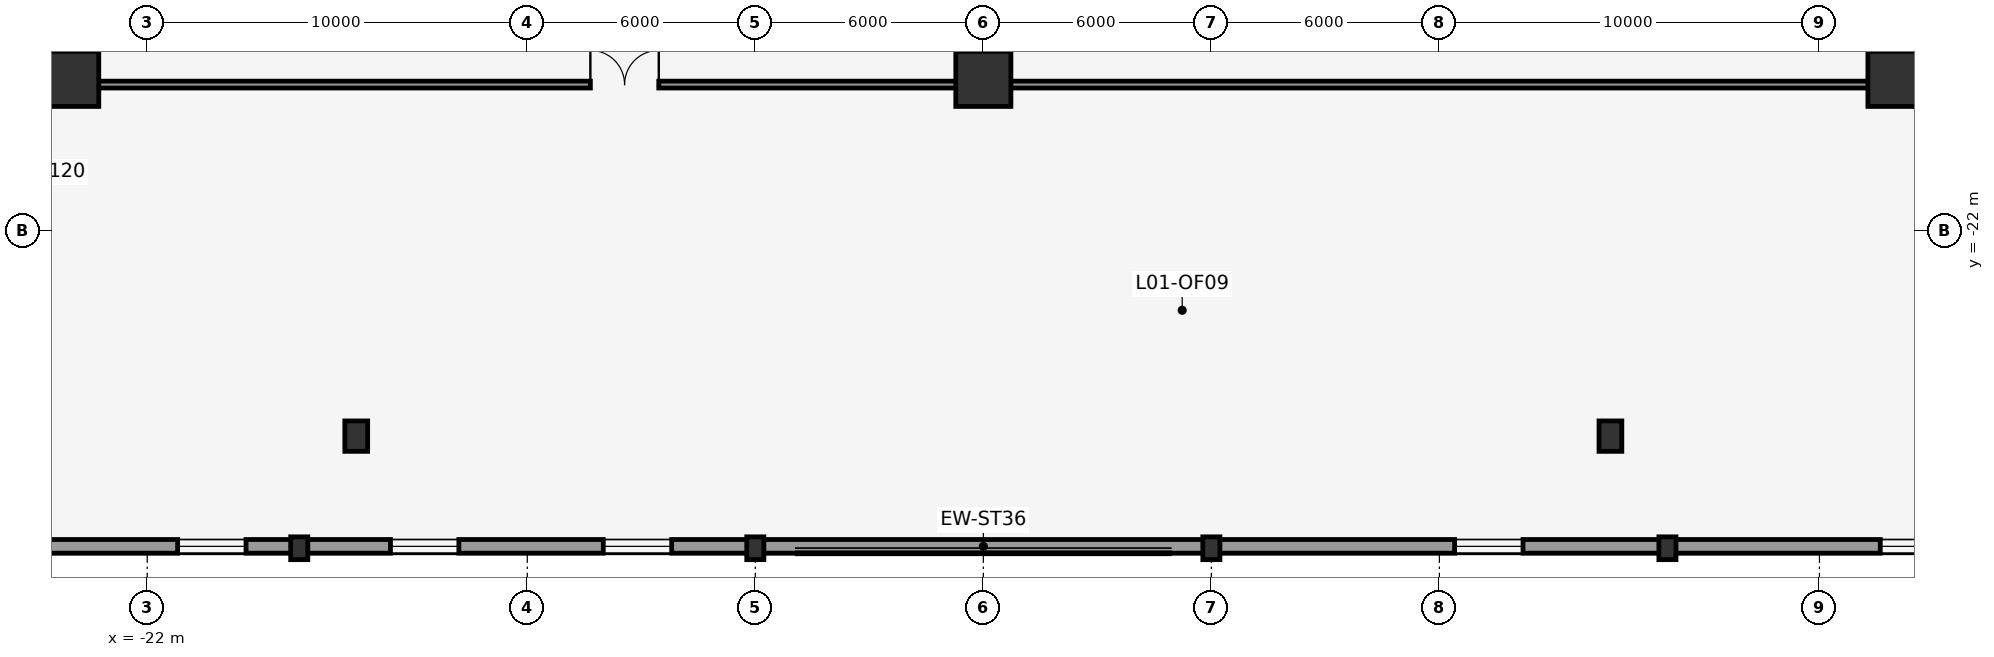
"""IFC4 building model, lengths in metres.
Left out: names, types, materials, properties, quantities, classifications, styles, units other than length and angle.
Written with IfcOpenShell. Run it as: python <this file> out.ifc"""

import sys

from ifc_helpers import new_model, si_unit, direction, frame, frame_2d, origin, origin_2d, place, context, subcontext, project, spatial, rectangle, hollow_rectangle, extrude, element, fill, save


model = new_model("IFC4")
c1 = context("Model", 3, precision=1e-05, world=origin(), true_north=direction((0.0, 1.0)))
c2 = subcontext(c1, "Body", "Model", "MODEL_VIEW")
j1 = project(units=[si_unit("LENGTHUNIT", "METRE"), si_unit("PLANEANGLEUNIT", "RADIAN")], contexts=[c1])
p1 = place(None, origin())
s1 = spatial("IfcSite", under=j1, at=p1, CompositionType="ELEMENT")
p2 = place(p1, origin())
s2 = spatial("IfcBuilding", under=s1, at=p2, CompositionType="ELEMENT")
p3 = place(p2, frame((0.0, 0.0, 6.0)))
s3 = spatial("IfcBuildingStorey", under=s2, at=p3, CompositionType="ELEMENT", Elevation=6.0)
for number, where, z_axis, x_axis in (
    (1, (-24.0, -18.0, 0.0), (0.0, 0.0, 1.0), (1.0, 0.0, 0.0)),
    (2, (24.0, -18.0, 0.0), (0.0, 0.0, 1.0), (1.0, 0.0, 0.0)),
    (3, (0.0, -18.0, 0.0), (0.0, 0.0, 1.0), (1.0, 0.0, 0.0)),
):
    element("IfcColumn", number, at=place(p3, frame(where, z_axis=z_axis, x_axis=x_axis)), inside=s3, PredefinedType="COLUMN", context=c2, shape_type="SweptSolid", body=[
        extrude(rectangle(XDim=1.45, YDim=1.45, at=origin_2d()), origin(), (0.0, 0.0, 1.0), 5.5),
    ])
for number, where, z_axis, x_axis in (
    (4, (-16.5, -27.4, 0.0), (0.0, 0.0, 1.0), (1.0, 0.0, 0.0)),
    (5, (16.5, -27.4, 0.0), (0.0, 0.0, 1.0), (1.0, 0.0, 0.0)),
):
    element("IfcColumn", number, at=place(p3, frame(where, z_axis=z_axis, x_axis=x_axis)), inside=s3, PredefinedType="COLUMN", context=c2, shape_type="SweptSolid", body=[
        extrude(hollow_rectangle(XDim=0.6, YDim=0.8, WallThickness=0.05, at=origin_2d()), origin(), (0.0, 0.0, 1.0), 5.5),
    ])
for number, where, z_axis, x_axis in (
    (6, (-18.0, -30.35, 0.0), (0.0, 0.0, 1.0), (1.0, 0.0, 0.0)),
    (7, (-6.0, -30.35, 0.0), (0.0, 0.0, 1.0), (1.0, 0.0, 0.0)),
    (8, (6.0, -30.35, 0.0), (0.0, 0.0, 1.0), (1.0, 0.0, 0.0)),
    (9, (18.0, -30.35, 0.0), (0.0, 0.0, 1.0), (1.0, 0.0, 0.0)),
):
    element("IfcColumn", number, at=place(p3, frame(where, z_axis=z_axis, x_axis=x_axis)), inside=s3, PredefinedType="PILASTER", context=c2, shape_type="SweptSolid", body=[
        extrude(rectangle(XDim=0.45, YDim=0.6, at=origin_2d()), origin(), (0.0, 0.0, 1.0), 5.5),
    ])
p4 = place(p3, frame((41.3, -30.3, 0.0), z_axis=(0.0, 0.0, 1.0), x_axis=(-1.0, 0.0, 0.0)))
e10 = element("IfcWall", 10, at=p4, inside=s3, PredefinedType="STANDARD", context=c2, shape_type="SweptSolid", body=[
    extrude(rectangle(XDim=82.6, YDim=0.36, at=frame_2d((41.3, 0.0))), origin(), (0.0, 0.0, 1.0), 5.2),
])
p5 = place(p4, frame((4.7, 0.0, 0.9)))
e11 = element("IfcOpeningElement", 11, at=p5, cuts=e10, PredefinedType="OPENING", context=c2, shape_type="SweptSolid", body=[
    extrude(rectangle(XDim=1.8, YDim=2.6, at=frame_2d((0.9, 1.3))), frame((0.0, 0.19, 0.0), z_axis=(0.0, -1.0, 0.0), x_axis=(1.0, 0.0, 0.0)), (0.0, 0.0, 1.0), 0.38),
])
p6 = place(p4, frame((15.9, 0.0, 0.9)))
e12 = element("IfcOpeningElement", 12, at=p6, cuts=e10, PredefinedType="OPENING", context=c2, shape_type="SweptSolid", body=[
    extrude(rectangle(XDim=1.8, YDim=2.6, at=frame_2d((0.9, 1.3))), frame((0.0, 0.19, 0.0), z_axis=(0.0, -1.0, 0.0), x_axis=(1.0, 0.0, 0.0)), (0.0, 0.0, 1.0), 0.38),
])
p7 = place(p4, frame((27.1, 0.0, 0.9)))
e13 = element("IfcOpeningElement", 13, at=p7, cuts=e10, PredefinedType="OPENING", context=c2, shape_type="SweptSolid", body=[
    extrude(rectangle(XDim=1.8, YDim=2.6, at=frame_2d((0.9, 1.3))), frame((0.0, 0.19, 0.0), z_axis=(0.0, -1.0, 0.0), x_axis=(1.0, 0.0, 0.0)), (0.0, 0.0, 1.0), 0.38),
])
p8 = place(p4, frame((49.5, 0.0, 0.9)))
e14 = element("IfcOpeningElement", 14, at=p8, cuts=e10, PredefinedType="OPENING", context=c2, shape_type="SweptSolid", body=[
    extrude(rectangle(XDim=1.8, YDim=2.6, at=frame_2d((0.9, 1.3))), frame((0.0, 0.19, 0.0), z_axis=(0.0, -1.0, 0.0), x_axis=(1.0, 0.0, 0.0)), (0.0, 0.0, 1.0), 0.38),
])
p9 = place(p4, frame((55.1, 0.0, 0.9)))
e15 = element("IfcOpeningElement", 15, at=p9, cuts=e10, PredefinedType="OPENING", context=c2, shape_type="SweptSolid", body=[
    extrude(rectangle(XDim=1.8, YDim=2.6, at=frame_2d((0.9, 1.3))), frame((0.0, 0.19, 0.0), z_axis=(0.0, -1.0, 0.0), x_axis=(1.0, 0.0, 0.0)), (0.0, 0.0, 1.0), 0.38),
])
p10 = place(p4, frame((60.7, 0.0, 0.9)))
e16 = element("IfcOpeningElement", 16, at=p10, cuts=e10, PredefinedType="OPENING", context=c2, shape_type="SweptSolid", body=[
    extrude(rectangle(XDim=1.8, YDim=2.6, at=frame_2d((0.9, 1.3))), frame((0.0, 0.19, 0.0), z_axis=(0.0, -1.0, 0.0), x_axis=(1.0, 0.0, 0.0)), (0.0, 0.0, 1.0), 0.38),
])
p11 = place(p4, frame((66.3, 0.0, 0.9)))
e17 = element("IfcOpeningElement", 17, at=p11, cuts=e10, PredefinedType="OPENING", context=c2, shape_type="SweptSolid", body=[
    extrude(rectangle(XDim=1.8, YDim=2.6, at=frame_2d((0.9, 1.3))), frame((0.0, 0.19, 0.0), z_axis=(0.0, -1.0, 0.0), x_axis=(1.0, 0.0, 0.0)), (0.0, 0.0, 1.0), 0.38),
])
p12 = place(p3, frame((-23.6, -18.15, 0.0), z_axis=(0.0, 0.0, 1.0), x_axis=(1.0, 0.0, 0.0)))
e18 = element("IfcWall", 18, at=p12, inside=s3, PredefinedType="PARTITIONING", context=c2, shape_type="SweptSolid", body=[
    extrude(rectangle(XDim=47.2, YDim=0.18, at=frame_2d((23.6, 0.0))), origin(), (0.0, 0.0, 1.0), 3.38),
])
p13 = place(p12, frame((13.26, 0.0, 0.0)))
e19 = element("IfcOpeningElement", 19, at=p13, cuts=e18, PredefinedType="OPENING", context=c2, shape_type="SweptSolid", body=[
    extrude(rectangle(XDim=1.8, YDim=2.2, at=frame_2d((0.9, 1.1))), frame((0.0, 0.1, 0.0), z_axis=(0.0, -1.0, 0.0), x_axis=(1.0, 0.0, 0.0)), (0.0, 0.0, 1.0), 0.2),
])
p14 = place(p6, origin())
e20 = element("IfcWindow", 20, at=p14, inside=s3, PartitioningType="DOUBLE_PANEL_VERTICAL", PredefinedType="WINDOW", context=c2, shape_type="SweptSolid", body=[
    extrude(rectangle(XDim=1.8, YDim=2.6, at=frame_2d((0.9, 1.3))), frame((0.0, 0.03, 0.0), z_axis=(0.0, -1.0, 0.0), x_axis=(1.0, 0.0, 0.0)), (0.0, 0.0, 1.0), 0.06),
])
fill(e12, e20)
p15 = place(p7, origin())
e21 = element("IfcWindow", 21, at=p15, inside=s3, PartitioningType="DOUBLE_PANEL_VERTICAL", PredefinedType="WINDOW", context=c2, shape_type="SweptSolid", body=[
    extrude(rectangle(XDim=1.8, YDim=2.6, at=frame_2d((0.9, 1.3))), frame((0.0, 0.03, 0.0), z_axis=(0.0, -1.0, 0.0), x_axis=(1.0, 0.0, 0.0)), (0.0, 0.0, 1.0), 0.06),
])
fill(e13, e21)
p16 = place(p8, origin())
e22 = element("IfcWindow", 22, at=p16, inside=s3, PartitioningType="DOUBLE_PANEL_VERTICAL", PredefinedType="WINDOW", context=c2, shape_type="SweptSolid", body=[
    extrude(rectangle(XDim=1.8, YDim=2.6, at=frame_2d((0.9, 1.3))), frame((0.0, 0.03, 0.0), z_axis=(0.0, -1.0, 0.0), x_axis=(1.0, 0.0, 0.0)), (0.0, 0.0, 1.0), 0.06),
])
fill(e14, e22)
p17 = place(p9, origin())
e23 = element("IfcWindow", 23, at=p17, inside=s3, PartitioningType="DOUBLE_PANEL_VERTICAL", PredefinedType="WINDOW", context=c2, shape_type="SweptSolid", body=[
    extrude(rectangle(XDim=1.8, YDim=2.6, at=frame_2d((0.9, 1.3))), frame((0.0, 0.03, 0.0), z_axis=(0.0, -1.0, 0.0), x_axis=(1.0, 0.0, 0.0)), (0.0, 0.0, 1.0), 0.06),
])
fill(e15, e23)
p18 = place(p10, origin())
e24 = element("IfcWindow", 24, at=p18, inside=s3, PartitioningType="DOUBLE_PANEL_VERTICAL", PredefinedType="WINDOW", context=c2, shape_type="SweptSolid", body=[
    extrude(rectangle(XDim=1.8, YDim=2.6, at=frame_2d((0.9, 1.3))), frame((0.0, 0.03, 0.0), z_axis=(0.0, -1.0, 0.0), x_axis=(1.0, 0.0, 0.0)), (0.0, 0.0, 1.0), 0.06),
])
fill(e16, e24)
p19 = place(p13, origin())
e25 = element("IfcDoor", 25, at=p19, inside=s3, OperationType="DOUBLE_DOOR_SINGLE_SWING", PredefinedType="DOOR", context=c2, shape_type="SweptSolid", body=[
    extrude(rectangle(XDim=1.8, YDim=2.2, at=frame_2d((0.9, 1.1))), frame((0.0, 0.025, 0.0), z_axis=(0.0, -1.0, 0.0), x_axis=(1.0, 0.0, 0.0)), (0.0, 0.0, 1.0), 0.05),
])
fill(e19, e25)
save(model, sys.argv[1])
